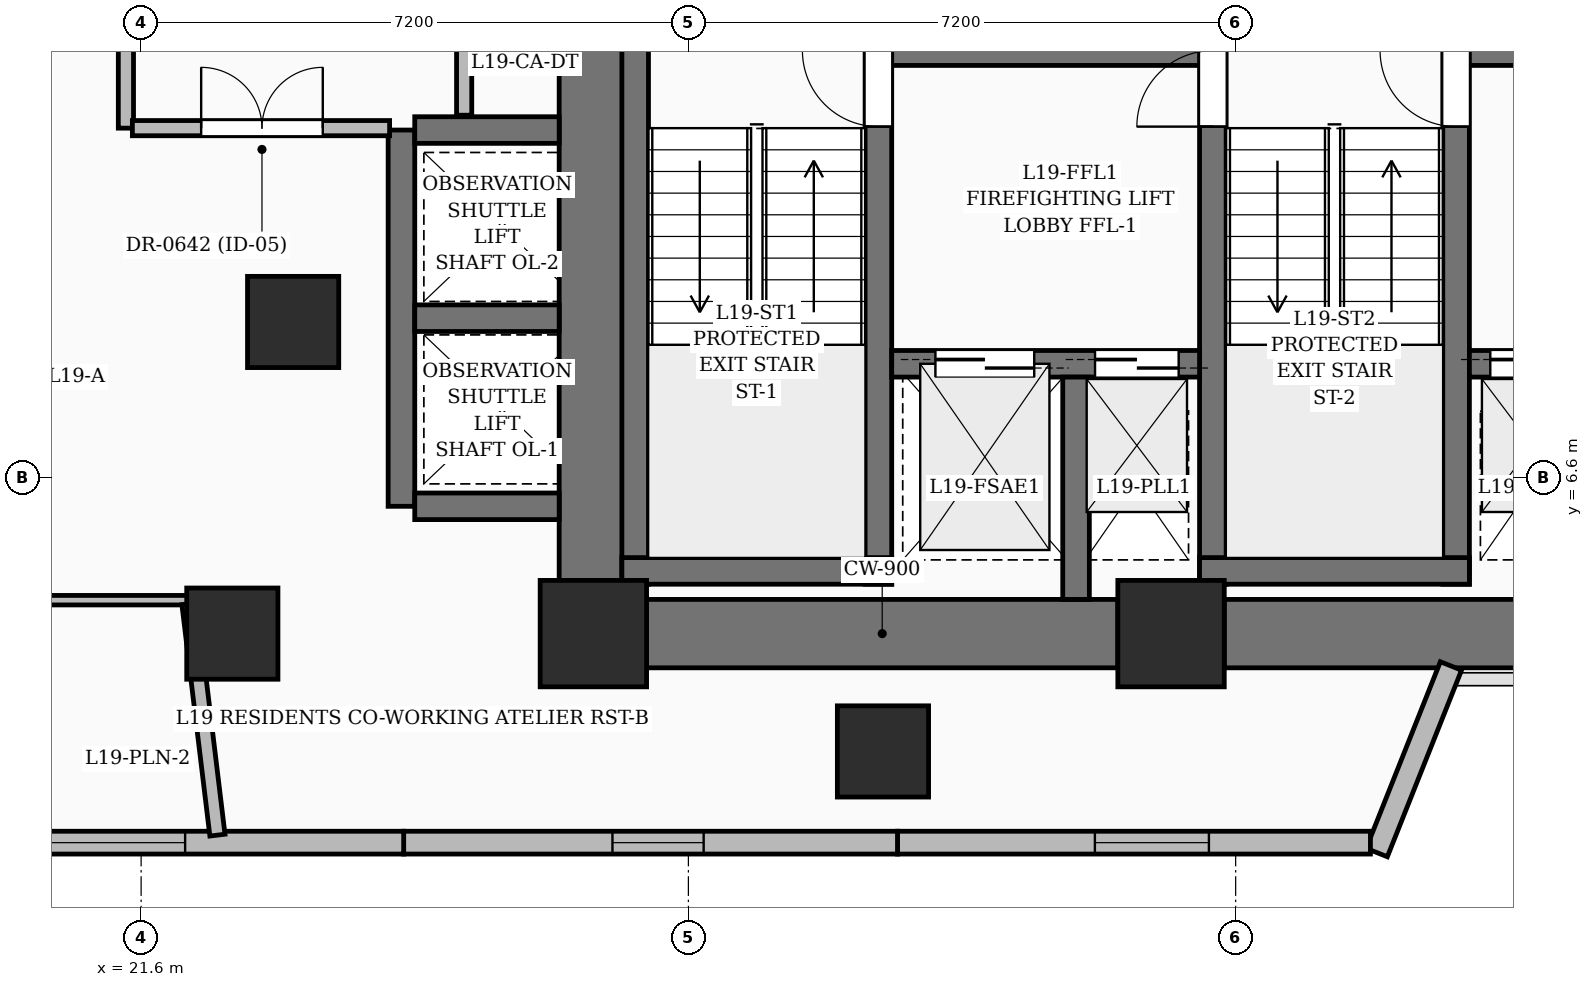
"""IFC4 building model, lengths in metres.
Left out: names, types, materials, properties, quantities, classifications, styles, units other than length and angle.
Written with IfcOpenShell. Run it as: python <this file> out.ifc"""

import sys

from ifc_helpers import new_model, si_unit, direction, frame, frame_2d, origin, origin_2d, place, context, subcontext, project, spatial, rectangle, extrude, element, fill, save


model = new_model("IFC4")
c1 = context("Model", 3, precision=1e-05, world=origin(), true_north=direction((0.0, 1.0)))
c2 = subcontext(c1, "Body", "Model", "MODEL_VIEW")
j1 = project(units=[si_unit("LENGTHUNIT", "METRE"), si_unit("PLANEANGLEUNIT", "RADIAN")], contexts=[c1])
p1 = place(None, origin())
s1 = spatial("IfcSite", under=j1, at=p1, CompositionType="ELEMENT")
p2 = place(p1, origin())
s2 = spatial("IfcBuilding", under=s1, at=p2, CompositionType="ELEMENT")
p3 = place(p2, frame((0.0, 0.0, 78.6)))
s3 = spatial("IfcBuildingStorey", under=s2, at=p3, CompositionType="ELEMENT", Elevation=78.6)
for number, where, z_axis, x_axis in (
    (1, (27.55, 4.55, 0.0), (0.0, 0.0, 1.0), (1.0, 0.0, 0.0)),
    (2, (35.15, 4.55, 0.0), (0.0, 0.0, 1.0), (1.0, 0.0, 0.0)),
):
    element("IfcColumn", number, at=place(p3, frame(where, z_axis=z_axis, x_axis=x_axis)), inside=s3, PredefinedType="COLUMN", context=c2, shape_type="SweptSolid", body=[
        extrude(rectangle(XDim=1.4, YDim=1.4, at=origin_2d()), origin(), (0.0, 0.0, 1.0), 3.6),
    ])
for number, where, z_axis, x_axis in (
    (3, (22.8, 4.55, 0.0), (0.0, 0.0, 1.0), (1.0, 0.0, 0.0)),
    (4, (23.6, 8.65, 0.0), (0.0, 0.0, 1.0), (1.0, 0.0, 0.0)),
):
    element("IfcColumn", number, at=place(p3, frame(where, z_axis=z_axis, x_axis=x_axis)), inside=s3, PredefinedType="COLUMN", context=c2, shape_type="SweptSolid", body=[
        extrude(rectangle(XDim=1.2, YDim=1.2, at=origin_2d()), origin(), (0.0, 0.0, 1.0), 3.6),
    ])
p4 = place(p3, frame((28.25, 4.55, 0.0), z_axis=(0.0, 0.0, 1.0), x_axis=(1.0, 0.0, 0.0)))
e5 = element("IfcWall", 5, at=p4, inside=s3, PredefinedType="SHEAR", context=c2, shape_type="SweptSolid", body=[
    extrude(rectangle(XDim=6.2, YDim=0.9, at=frame_2d((3.1, 0.0))), origin(), (0.0, 0.0, 1.0), 3.6),
])
p5 = place(p3, frame((35.85, 4.55, 0.0), z_axis=(0.0, 0.0, 1.0), x_axis=(1.0, 0.0, 0.0)))
e6 = element("IfcWall", 6, at=p5, inside=s3, PredefinedType="SHEAR", context=c2, shape_type="SweptSolid", body=[
    extrude(rectangle(XDim=10.5, YDim=0.9, at=frame_2d((5.25, 0.0))), origin(), (0.0, 0.0, 1.0), 3.6),
])
p6 = place(p3, frame((27.55, 5.25, 0.0), z_axis=(0.0, 0.0, 1.0), x_axis=(0.0, 1.0, 0.0)))
e7 = element("IfcWall", 7, at=p6, inside=s3, PredefinedType="SHEAR", context=c2, shape_type="SweptSolid", body=[
    extrude(rectangle(XDim=8.8, YDim=0.9, at=frame_2d((4.4, 0.0))), origin(), (0.0, 0.0, 1.0), 3.6),
])
p7 = place(p3, frame((28.1, 5.2, 0.0), z_axis=(0.0, 0.0, 1.0), x_axis=(0.0, 1.0, 0.0)))
e8 = element("IfcWall", 8, at=p7, inside=s3, PredefinedType="SOLIDWALL", context=c2, shape_type="SweptSolid", body=[
    extrude(rectangle(XDim=9.1, YDim=0.35, at=frame_2d((4.55, 0.0))), origin(), (0.0, 0.0, 1.0), 3.6),
])
p8 = place(p3, frame((31.3, 5.2, 0.0), z_axis=(0.0, 0.0, 1.0), x_axis=(0.0, 1.0, 0.0)))
e9 = element("IfcWall", 9, at=p8, inside=s3, PredefinedType="SOLIDWALL", context=c2, shape_type="SweptSolid", body=[
    extrude(rectangle(XDim=9.1, YDim=0.35, at=frame_2d((4.55, 0.0))), origin(), (0.0, 0.0, 1.0), 3.6),
])
p9 = place(p8, frame((6.02, 0.0, 0.0)))
e10 = element("IfcOpeningElement", 10, at=p9, cuts=e9, PredefinedType="OPENING", context=c2, shape_type="SweptSolid", body=[
    extrude(rectangle(XDim=1.0, YDim=2.15, at=frame_2d((0.5, 1.075))), frame((0.0, 0.185, 0.0), z_axis=(0.0, -1.0, 0.0), x_axis=(1.0, 0.0, 0.0)), (0.0, 0.0, 1.0), 0.37),
])
p10 = place(p3, frame((27.925, 5.375, 0.0), z_axis=(0.0, 0.0, 1.0), x_axis=(1.0, 0.0, 0.0)))
e11 = element("IfcWall", 11, at=p10, inside=s3, PredefinedType="SOLIDWALL", context=c2, shape_type="SweptSolid", body=[
    extrude(rectangle(XDim=3.55, YDim=0.35, at=frame_2d((1.775, 0.0))), origin(), (0.0, 0.0, 1.0), 3.6),
])
p11 = place(p3, frame((35.7, 5.2, 0.0), z_axis=(0.0, 0.0, 1.0), x_axis=(0.0, 1.0, 0.0)))
e12 = element("IfcWall", 12, at=p11, inside=s3, PredefinedType="SOLIDWALL", context=c2, shape_type="SweptSolid", body=[
    extrude(rectangle(XDim=9.1, YDim=0.35, at=frame_2d((4.55, 0.0))), origin(), (0.0, 0.0, 1.0), 3.6),
])
p12 = place(p11, frame((6.02, 0.0, 0.0)))
e13 = element("IfcOpeningElement", 13, at=p12, cuts=e12, PredefinedType="OPENING", context=c2, shape_type="SweptSolid", body=[
    extrude(rectangle(XDim=1.0, YDim=2.15, at=frame_2d((0.5, 1.075))), frame((0.0, 0.185, 0.0), z_axis=(0.0, -1.0, 0.0), x_axis=(1.0, 0.0, 0.0)), (0.0, 0.0, 1.0), 0.37),
])
p13 = place(p3, frame((38.9, 5.2, 0.0), z_axis=(0.0, 0.0, 1.0), x_axis=(0.0, 1.0, 0.0)))
e14 = element("IfcWall", 14, at=p13, inside=s3, PredefinedType="SOLIDWALL", context=c2, shape_type="SweptSolid", body=[
    extrude(rectangle(XDim=9.1, YDim=0.35, at=frame_2d((4.55, 0.0))), origin(), (0.0, 0.0, 1.0), 3.6),
])
p14 = place(p13, frame((6.02, 0.0, 0.0)))
e15 = element("IfcOpeningElement", 15, at=p14, cuts=e14, PredefinedType="OPENING", context=c2, shape_type="SweptSolid", body=[
    extrude(rectangle(XDim=1.0, YDim=2.15, at=frame_2d((0.5, 1.075))), frame((0.0, 0.185, 0.0), z_axis=(0.0, -1.0, 0.0), x_axis=(1.0, 0.0, 0.0)), (0.0, 0.0, 1.0), 0.37),
])
p15 = place(p3, frame((35.525, 5.375, 0.0), z_axis=(0.0, 0.0, 1.0), x_axis=(1.0, 0.0, 0.0)))
e16 = element("IfcWall", 16, at=p15, inside=s3, PredefinedType="SOLIDWALL", context=c2, shape_type="SweptSolid", body=[
    extrude(rectangle(XDim=3.55, YDim=0.35, at=frame_2d((1.775, 0.0))), origin(), (0.0, 0.0, 1.0), 3.6),
])
p16 = place(p3, frame((31.475, 8.1, 0.0), z_axis=(0.0, 0.0, 1.0), x_axis=(1.0, 0.0, 0.0)))
e17 = element("IfcWall", 17, at=p16, inside=s3, PredefinedType="SOLIDWALL", context=c2, shape_type="SweptSolid", body=[
    extrude(rectangle(XDim=4.05, YDim=0.35, at=frame_2d((2.025, 0.0))), origin(), (0.0, 0.0, 1.0), 3.6),
])
p17 = place(p16, frame((0.575, 0.0, 0.0)))
e18 = element("IfcOpeningElement", 18, at=p17, cuts=e17, PredefinedType="OPENING", context=c2, shape_type="SweptSolid", body=[
    extrude(rectangle(XDim=1.3, YDim=2.25, at=frame_2d((0.65, 1.125))), frame((0.0, 0.185, 0.0), z_axis=(0.0, -1.0, 0.0), x_axis=(1.0, 0.0, 0.0)), (0.0, 0.0, 1.0), 0.37),
])
p18 = place(p16, frame((2.675, 0.0, 0.0)))
e19 = element("IfcOpeningElement", 19, at=p18, cuts=e17, PredefinedType="OPENING", context=c2, shape_type="SweptSolid", body=[
    extrude(rectangle(XDim=1.1, YDim=2.2, at=frame_2d((0.55, 1.1))), frame((0.0, 0.185, 0.0), z_axis=(0.0, -1.0, 0.0), x_axis=(1.0, 0.0, 0.0)), (0.0, 0.0, 1.0), 0.37),
])
p19 = place(p3, frame((39.075, 8.1, 0.0), z_axis=(0.0, 0.0, 1.0), x_axis=(1.0, 0.0, 0.0)))
e20 = element("IfcWall", 20, at=p19, inside=s3, PredefinedType="SOLIDWALL", context=c2, shape_type="SweptSolid", body=[
    extrude(rectangle(XDim=4.05, YDim=0.35, at=frame_2d((2.025, 0.0))), origin(), (0.0, 0.0, 1.0), 3.6),
])
p20 = place(p19, frame((2.175, 0.0, 0.0)))
e21 = element("IfcOpeningElement", 21, at=p20, cuts=e20, PredefinedType="OPENING", context=c2, shape_type="SweptSolid", body=[
    extrude(rectangle(XDim=1.3, YDim=2.25, at=frame_2d((0.65, 1.125))), frame((0.0, 0.185, 0.0), z_axis=(0.0, -1.0, 0.0), x_axis=(1.0, 0.0, 0.0)), (0.0, 0.0, 1.0), 0.37),
])
p21 = place(p19, frame((0.275, 0.0, 0.0)))
e22 = element("IfcOpeningElement", 22, at=p21, cuts=e20, PredefinedType="OPENING", context=c2, shape_type="SweptSolid", body=[
    extrude(rectangle(XDim=1.1, YDim=2.2, at=frame_2d((0.55, 1.1))), frame((0.0, 0.185, 0.0), z_axis=(0.0, -1.0, 0.0), x_axis=(1.0, 0.0, 0.0)), (0.0, 0.0, 1.0), 0.37),
])
p22 = place(p3, frame((33.9, 5.0, 0.0), z_axis=(0.0, 0.0, 1.0), x_axis=(0.0, 1.0, 0.0)))
e23 = element("IfcWall", 23, at=p22, inside=s3, PredefinedType="SOLIDWALL", context=c2, shape_type="SweptSolid", body=[
    extrude(rectangle(XDim=2.925, YDim=0.35, at=frame_2d((1.462, 0.0))), origin(), (0.0, 0.0, 1.0), 3.6),
])
p23 = place(p3, frame((31.475, 12.2, 0.0), z_axis=(0.0, 0.0, 1.0), x_axis=(1.0, 0.0, 0.0)))
e24 = element("IfcWall", 24, at=p23, inside=s3, PredefinedType="SOLIDWALL", context=c2, shape_type="SweptSolid", body=[
    extrude(rectangle(XDim=4.05, YDim=0.35, at=frame_2d((2.025, 0.0))), origin(), (0.0, 0.0, 1.0), 3.6),
])
p24 = place(p3, frame((39.075, 12.2, 0.0), z_axis=(0.0, 0.0, 1.0), x_axis=(1.0, 0.0, 0.0)))
e25 = element("IfcWall", 25, at=p24, inside=s3, PredefinedType="SOLIDWALL", context=c2, shape_type="SweptSolid", body=[
    extrude(rectangle(XDim=4.05, YDim=0.35, at=frame_2d((2.025, 0.0))), origin(), (0.0, 0.0, 1.0), 3.6),
])
p25 = place(p3, frame((25.025, 6.225, 0.0), z_axis=(0.0, 0.0, 1.0), x_axis=(0.0, 1.0, 0.0)))
e26 = element("IfcWall", 26, at=p25, inside=s3, PredefinedType="SOLIDWALL", context=c2, shape_type="SweptSolid", body=[
    extrude(rectangle(XDim=4.95, YDim=0.35, at=frame_2d((2.475, 0.0))), origin(), (0.0, 0.0, 1.0), 3.6),
])
for number, where, z_axis, x_axis in (
    (27, (25.2, 6.225, 0.0), (0.0, 0.0, 1.0), (1.0, 0.0, 0.0)),
    (28, (25.2, 8.7, 0.0), (0.0, 0.0, 1.0), (1.0, 0.0, 0.0)),
    (29, (25.2, 11.175, 0.0), (0.0, 0.0, 1.0), (1.0, 0.0, 0.0)),
):
    element("IfcWall", number, at=place(p3, frame(where, z_axis=z_axis, x_axis=x_axis)), inside=s3, PredefinedType="SOLIDWALL", context=c2, shape_type="SweptSolid", body=[
        extrude(rectangle(XDim=1.9, YDim=0.35, at=frame_2d((0.95, 0.0))), origin(), (0.0, 0.0, 1.0), 3.6),
    ])
p26 = place(p3, frame((31.36, 3.0, 0.0), z_axis=(0.0, 0.0, 1.0), x_axis=(1.0, 0.0, 0.0)))
e30 = element("IfcColumn", 30, at=p26, inside=s3, PredefinedType="COLUMN", context=c2, shape_type="SweptSolid", body=[
    extrude(rectangle(XDim=1.2, YDim=1.2, at=origin_2d()), origin(), (0.0, 0.0, 1.0), 3.6),
])
p27 = place(p3, frame((38.833, 4.125, 0.0), z_axis=(0.0, 0.0, 1.0), x_axis=(-0.369557636099, -0.929207809696, 0.0)))
e31 = element("IfcWall", 31, at=p27, inside=s3, PredefinedType="SOLIDWALL", context=c2, shape_type="SweptSolid", body=[
    extrude(rectangle(XDim=2.642, YDim=0.3, at=frame_2d((1.321, 0.0))), origin(), (0.0, 0.0, 1.0), 2.35),
])
p28 = place(p3, frame((37.773, 1.8, 0.0), z_axis=(0.0, 0.0, 1.0), x_axis=(-1.0, 0.0, 0.0)))
e32 = element("IfcWall", 32, at=p28, inside=s3, PredefinedType="SOLIDWALL", context=c2, shape_type="SweptSolid", body=[
    extrude(rectangle(XDim=6.222, YDim=0.3, at=frame_2d((3.111, 0.0))), origin(), (0.0, 0.0, 1.0), 3.35),
])
p29 = place(p28, frame((2.125, 0.0, 0.6)))
e33 = element("IfcOpeningElement", 33, at=p29, cuts=e32, PredefinedType="OPENING", context=c2, shape_type="SweptSolid", body=[
    extrude(rectangle(XDim=1.5, YDim=2.1, at=frame_2d((0.75, 1.05))), frame((0.0, 0.16, 0.0), z_axis=(0.0, -1.0, 0.0), x_axis=(1.0, 0.0, 0.0)), (0.0, 0.0, 1.0), 0.32),
])
p30 = place(p3, frame((31.551, 1.8, 0.0), z_axis=(0.0, 0.0, 1.0), x_axis=(-1.0, 0.0, 0.0)))
e34 = element("IfcWall", 34, at=p30, inside=s3, PredefinedType="SOLIDWALL", context=c2, shape_type="SweptSolid", body=[
    extrude(rectangle(XDim=6.497, YDim=0.3, at=frame_2d((3.249, 0.0))), origin(), (0.0, 0.0, 1.0), 3.35),
])
p31 = place(p30, frame((2.55, 0.0, 0.8)))
e35 = element("IfcOpeningElement", 35, at=p31, cuts=e34, PredefinedType="OPENING", context=c2, shape_type="SweptSolid", body=[
    extrude(rectangle(XDim=1.2, YDim=1.8, at=frame_2d((0.6, 0.9))), frame((0.0, 0.16, 0.0), z_axis=(0.0, -1.0, 0.0), x_axis=(1.0, 0.0, 0.0)), (0.0, 0.0, 1.0), 0.32),
])
p32 = place(p3, frame((25.054, 1.8, 0.0), z_axis=(0.0, 0.0, 1.0), x_axis=(-1.0, 0.0, 0.0)))
e36 = element("IfcWall", 36, at=p32, inside=s3, PredefinedType="SOLIDWALL", context=c2, shape_type="SweptSolid", body=[
    extrude(rectangle(XDim=6.497, YDim=0.3, at=frame_2d((3.249, 0.0))), origin(), (0.0, 0.0, 1.0), 3.35),
])
p33 = place(p32, frame((2.875, 0.0, 0.6)))
e37 = element("IfcOpeningElement", 37, at=p33, cuts=e36, PredefinedType="OPENING", context=c2, shape_type="SweptSolid", body=[
    extrude(rectangle(XDim=1.8, YDim=2.1, at=frame_2d((0.9, 1.05))), frame((0.0, 0.16, 0.0), z_axis=(0.0, -1.0, 0.0), x_axis=(1.0, 0.0, 0.0)), (0.0, 0.0, 1.0), 0.32),
])
p34 = place(p3, frame((25.85, 11.37, 0.0), z_axis=(0.0, 0.0, 1.0), x_axis=(0.0, 1.0, 0.0)))
e38 = element("IfcWall", 38, at=p34, inside=s3, PredefinedType="PARTITIONING", context=c2, shape_type="SweptSolid", body=[
    extrude(rectangle(XDim=3.34, YDim=0.2, at=frame_2d((1.67, 0.0))), origin(), (0.0, 0.0, 1.0), 3.35),
])
p35 = place(p34, frame((1.9, 0.0, 0.0)))
e39 = element("IfcOpeningElement", 39, at=p35, cuts=e38, PredefinedType="OPENING", context=c2, shape_type="SweptSolid", body=[
    extrude(rectangle(XDim=0.9, YDim=2.1, at=frame_2d((0.45, 1.05))), frame((0.0, 0.11, 0.0), z_axis=(0.0, -1.0, 0.0), x_axis=(1.0, 0.0, 0.0)), (0.0, 0.0, 1.0), 0.22),
])
p36 = place(p3, frame((21.4, 15.0, 0.0), z_axis=(0.0, 0.0, 1.0), x_axis=(0.0, -1.0, 0.0)))
e40 = element("IfcWall", 40, at=p36, inside=s3, PredefinedType="PARTITIONING", context=c2, shape_type="SweptSolid", body=[
    extrude(rectangle(XDim=3.8, YDim=0.2, at=frame_2d((1.9, 0.0))), origin(), (0.0, 0.0, 1.0), 3.01),
])
p37 = place(p36, frame((1.262, 0.0, 0.0)))
e41 = element("IfcOpeningElement", 41, at=p37, cuts=e40, PredefinedType="OPENING", context=c2, shape_type="SweptSolid", body=[
    extrude(rectangle(XDim=1.0, YDim=2.2, at=frame_2d((0.5, 1.1))), frame((0.0, 0.11, 0.0), z_axis=(0.0, -1.0, 0.0), x_axis=(1.0, 0.0, 0.0)), (0.0, 0.0, 1.0), 0.22),
])
p38 = place(p3, frame((21.485, 11.2, 0.0), z_axis=(0.0, 0.0, 1.0), x_axis=(1.0, 0.0, 0.0)))
e42 = element("IfcWall", 42, at=p38, inside=s3, PredefinedType="PARTITIONING", context=c2, shape_type="SweptSolid", body=[
    extrude(rectangle(XDim=3.384, YDim=0.2, at=frame_2d((1.692, 0.0))), origin(), (0.0, 0.0, 1.0), 3.35),
])
p39 = place(p38, frame((0.905, 0.0, 0.0)))
e43 = element("IfcOpeningElement", 43, at=p39, cuts=e42, PredefinedType="OPENING", context=c2, shape_type="SweptSolid", body=[
    extrude(rectangle(XDim=1.6, YDim=2.3, at=frame_2d((0.8, 1.15))), frame((0.0, 0.11, 0.0), z_axis=(0.0, -1.0, 0.0), x_axis=(1.0, 0.0, 0.0)), (0.0, 0.0, 1.0), 0.22),
])
p40 = place(p3, frame((20.11, 4.99, 0.0), z_axis=(0.0, 0.0, 1.0), x_axis=(1.0, 0.0, 0.0)))
e44 = element("IfcWall", 44, at=p40, inside=s3, PredefinedType="PARTITIONING", context=c2, shape_type="SweptSolid", body=[
    extrude(rectangle(XDim=2.12, YDim=0.125, at=frame_2d((1.06, 0.0))), origin(), (0.0, 0.0, 1.0), 3.01),
])
p41 = place(p3, frame((21.34, 15.1, 0.0), z_axis=(0.0, 0.0, 1.0), x_axis=(-0.706759638276, -0.707453753756, 0.0)))
e45 = element("IfcWall", 45, at=p41, inside=s3, PredefinedType="PARTITIONING", context=c2, shape_type="SweptSolid", body=[
    extrude(rectangle(XDim=13.014, YDim=0.2, at=frame_2d((6.507, 0.0))), origin(), (0.0, 0.0, 1.0), 2.345),
])
p42 = place(p3, frame((22.604, 1.899, 0.0), z_axis=(0.0, 0.0, 1.0), x_axis=(-0.120074545748, 0.992764878238, 0.0)))
e46 = element("IfcWall", 46, at=p42, inside=s3, PredefinedType="PARTITIONING", context=c2, shape_type="SweptSolid", body=[
    extrude(rectangle(XDim=3.066, YDim=0.2, at=frame_2d((1.533, 0.0))), origin(), (0.0, 0.0, 1.0), 2.345),
])
p43 = place(p29, origin())
e47 = element("IfcWindow", 47, at=p43, inside=s3, PartitioningType="SINGLE_PANEL", PredefinedType="WINDOW", context=c2, shape_type="SweptSolid", body=[
    extrude(rectangle(XDim=1.5, YDim=2.1, at=frame_2d((0.75, 1.05))), frame((0.0, 0.03, 0.0), z_axis=(0.0, -1.0, 0.0), x_axis=(1.0, 0.0, 0.0)), (0.0, 0.0, 1.0), 0.06),
])
fill(e33, e47)
p44 = place(p31, origin())
e48 = element("IfcWindow", 48, at=p44, inside=s3, PartitioningType="SINGLE_PANEL", PredefinedType="WINDOW", context=c2, shape_type="SweptSolid", body=[
    extrude(rectangle(XDim=1.2, YDim=1.8, at=frame_2d((0.6, 0.9))), frame((0.0, 0.03, 0.0), z_axis=(0.0, -1.0, 0.0), x_axis=(1.0, 0.0, 0.0)), (0.0, 0.0, 1.0), 0.06),
])
fill(e35, e48)
p45 = place(p33, origin())
e49 = element("IfcWindow", 49, at=p45, inside=s3, PartitioningType="SINGLE_PANEL", PredefinedType="WINDOW", context=c2, shape_type="SweptSolid", body=[
    extrude(rectangle(XDim=1.8, YDim=2.1, at=frame_2d((0.9, 1.05))), frame((0.0, 0.03, 0.0), z_axis=(0.0, -1.0, 0.0), x_axis=(1.0, 0.0, 0.0)), (0.0, 0.0, 1.0), 0.06),
])
fill(e37, e49)
p46 = place(p9, origin())
e50 = element("IfcDoor", 50, at=p46, inside=s3, OperationType="SINGLE_SWING_RIGHT", PredefinedType="DOOR", context=c2, shape_type="SweptSolid", body=[
    extrude(rectangle(XDim=1.0, YDim=2.15, at=frame_2d((0.5, 1.075))), frame((0.0, 0.025, 0.0), z_axis=(0.0, -1.0, 0.0), x_axis=(1.0, 0.0, 0.0)), (0.0, 0.0, 1.0), 0.05),
])
fill(e10, e50)
p47 = place(p12, origin())
e51 = element("IfcDoor", 51, at=p47, inside=s3, OperationType="SINGLE_SWING_LEFT", PredefinedType="DOOR", context=c2, shape_type="SweptSolid", body=[
    extrude(rectangle(XDim=1.0, YDim=2.15, at=frame_2d((0.5, 1.075))), frame((0.0, 0.025, 0.0), z_axis=(0.0, -1.0, 0.0), x_axis=(1.0, 0.0, 0.0)), (0.0, 0.0, 1.0), 0.05),
])
fill(e13, e51)
p48 = place(p14, origin())
e52 = element("IfcDoor", 52, at=p48, inside=s3, OperationType="SINGLE_SWING_RIGHT", PredefinedType="DOOR", context=c2, shape_type="SweptSolid", body=[
    extrude(rectangle(XDim=1.0, YDim=2.15, at=frame_2d((0.5, 1.075))), frame((0.0, 0.025, 0.0), z_axis=(0.0, -1.0, 0.0), x_axis=(1.0, 0.0, 0.0)), (0.0, 0.0, 1.0), 0.05),
])
fill(e15, e52)
p49 = place(p17, origin())
e53 = element("IfcDoor", 53, at=p49, inside=s3, OperationType="DOUBLE_DOOR_SLIDING", PredefinedType="DOOR", context=c2, shape_type="SweptSolid", body=[
    extrude(rectangle(XDim=1.3, YDim=2.25, at=frame_2d((0.65, 1.125))), frame((0.0, 0.025, 0.0), z_axis=(0.0, -1.0, 0.0), x_axis=(1.0, 0.0, 0.0)), (0.0, 0.0, 1.0), 0.05),
])
fill(e18, e53)
p50 = place(p18, origin())
e54 = element("IfcDoor", 54, at=p50, inside=s3, OperationType="DOUBLE_DOOR_SLIDING", PredefinedType="DOOR", context=c2, shape_type="SweptSolid", body=[
    extrude(rectangle(XDim=1.1, YDim=2.2, at=frame_2d((0.55, 1.1))), frame((0.0, 0.025, 0.0), z_axis=(0.0, -1.0, 0.0), x_axis=(1.0, 0.0, 0.0)), (0.0, 0.0, 1.0), 0.05),
])
fill(e19, e54)
p51 = place(p21, origin())
e55 = element("IfcDoor", 55, at=p51, inside=s3, OperationType="DOUBLE_DOOR_SLIDING", PredefinedType="DOOR", context=c2, shape_type="SweptSolid", body=[
    extrude(rectangle(XDim=1.1, YDim=2.2, at=frame_2d((0.55, 1.1))), frame((0.0, 0.025, 0.0), z_axis=(0.0, -1.0, 0.0), x_axis=(1.0, 0.0, 0.0)), (0.0, 0.0, 1.0), 0.05),
])
fill(e22, e55)
p52 = place(p39, origin())
e56 = element("IfcDoor", 56, at=p52, inside=s3, OperationType="DOUBLE_DOOR_SINGLE_SWING", PredefinedType="DOOR", context=c2, shape_type="SweptSolid", body=[
    extrude(rectangle(XDim=1.6, YDim=2.3, at=frame_2d((0.8, 1.15))), frame((0.0, 0.025, 0.0), z_axis=(0.0, -1.0, 0.0), x_axis=(1.0, 0.0, 0.0)), (0.0, 0.0, 1.0), 0.05),
])
fill(e43, e56)
save(model, sys.argv[1])
